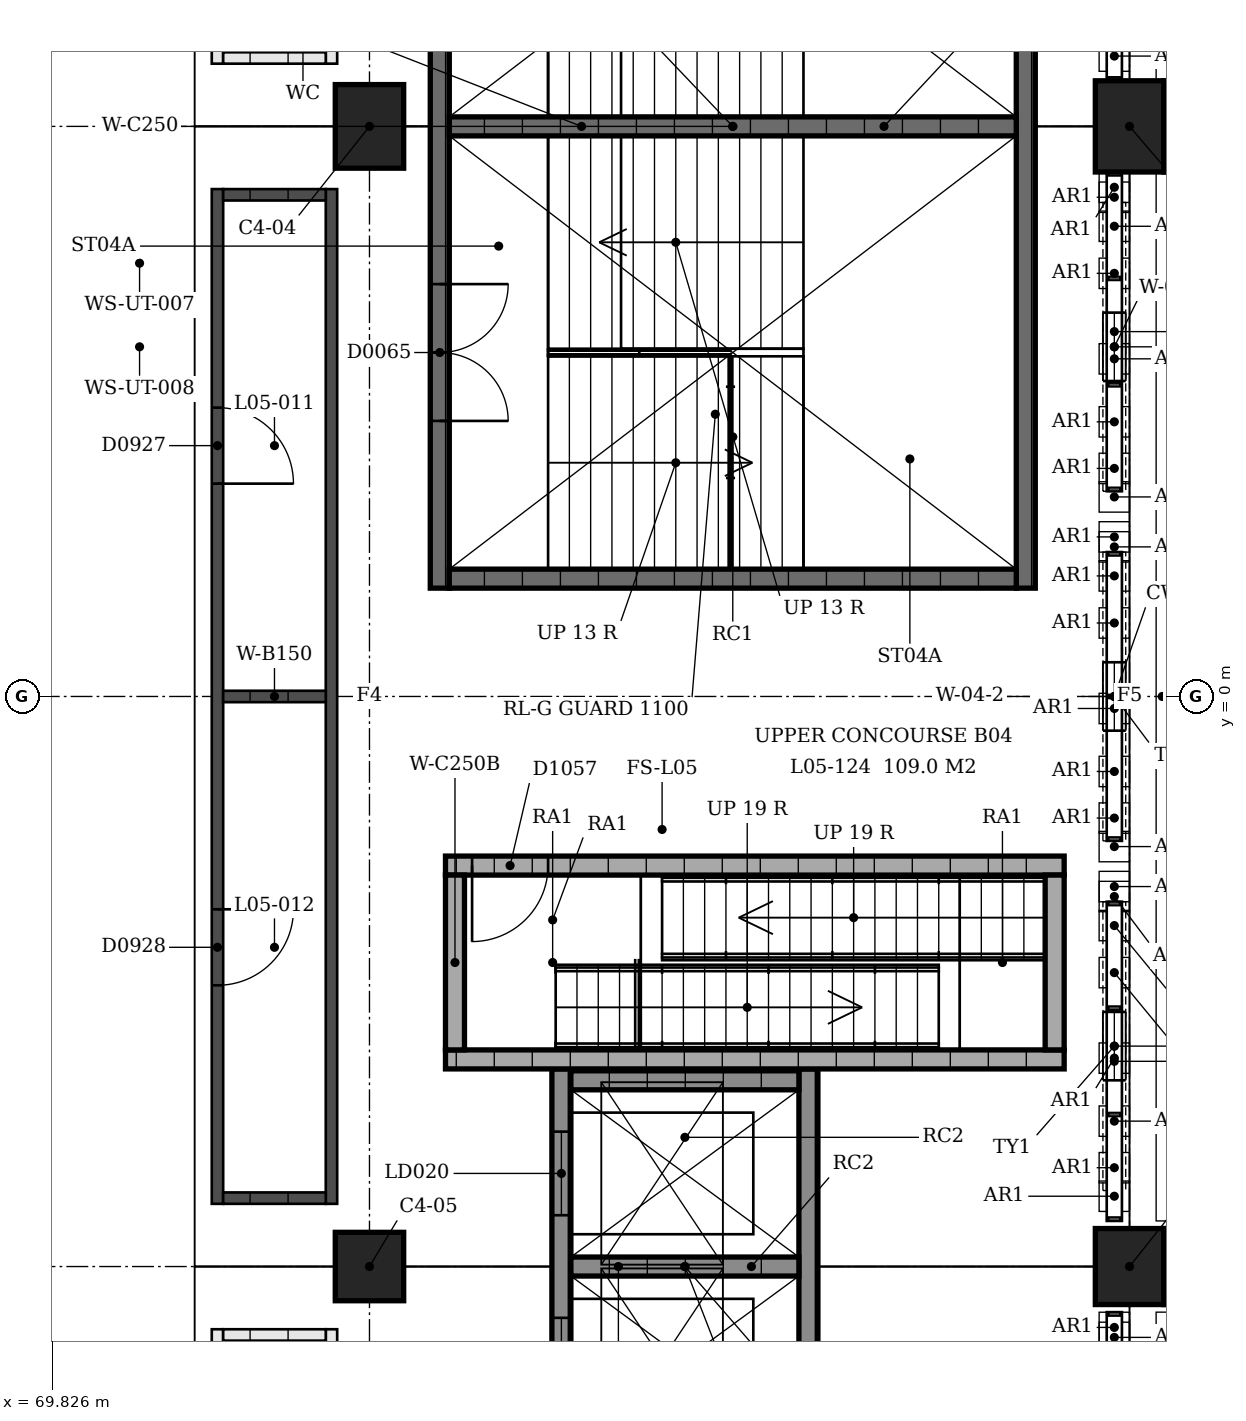
"""IFC4 building model, lengths in metres.
Left out: names, types, materials, properties, quantities, classifications, styles, units other than length and angle.
Written with IfcOpenShell. Run it as: python <this file> out.ifc"""

import sys

from ifc_helpers import new_model, si_unit, direction, frame, frame_2d, origin, origin_2d, place, context, subcontext, project, spatial, polyline, rectangle, outline, extrude, element, fill, save


model = new_model("IFC4")
c1 = context("Model", 3, precision=1e-05, world=origin(), true_north=direction((0.0, 1.0)))
c2 = subcontext(c1, "Body", "Model", "MODEL_VIEW")
j1 = project(units=[si_unit("LENGTHUNIT", "METRE"), si_unit("PLANEANGLEUNIT", "RADIAN")], contexts=[c1])
p1 = place(None, origin())
s1 = spatial("IfcSite", under=j1, at=p1, CompositionType="ELEMENT")
p2 = place(p1, origin())
s2 = spatial("IfcBuilding", under=s1, at=p2, CompositionType="ELEMENT")
p3 = place(p2, frame((0.0, 0.0, 22.5)))
s3 = spatial("IfcBuildingStorey", under=s2, at=p3, CompositionType="ELEMENT", Elevation=22.5)
p4 = place(p3, frame((74.0, 7.5, 0.0), z_axis=(0.0, 0.0, 1.0), x_axis=(0.0, 1.0, 0.0)))
e1 = element("IfcColumn", 1, at=p4, inside=s3, PredefinedType="COLUMN", context=c2, shape_type="SweptSolid", body=[
    extrude(rectangle(XDim=1.1, YDim=0.9, at=origin_2d()), origin(), (0.0, 0.0, 1.0), 6.5),
])
p5 = place(p3, frame((84.0, 7.5, 0.0), z_axis=(0.0, 0.0, 1.0), x_axis=(0.0, 1.0, 0.0)))
e2 = element("IfcColumn", 2, at=p5, inside=s3, PredefinedType="COLUMN", context=c2, shape_type="SweptSolid", body=[
    extrude(rectangle(XDim=1.2, YDim=0.9, at=origin_2d()), origin(), (0.0, 0.0, 1.0), 6.5),
])
p6 = place(p3, frame((74.0, -7.5, 0.0), z_axis=(0.0, 0.0, 1.0), x_axis=(0.0, 1.0, 0.0)))
e3 = element("IfcColumn", 3, at=p6, inside=s3, PredefinedType="COLUMN", context=c2, shape_type="SweptSolid", body=[
    extrude(rectangle(XDim=0.9, YDim=0.9, at=origin_2d()), origin(), (0.0, 0.0, 1.0), 6.5),
])
p7 = place(p3, frame((84.0, -7.5, 0.0), z_axis=(0.0, 0.0, 1.0), x_axis=(0.0, 1.0, 0.0)))
e4 = element("IfcColumn", 4, at=p7, inside=s3, PredefinedType="COLUMN", context=c2, shape_type="SweptSolid", body=[
    extrude(rectangle(XDim=1.0, YDim=0.9, at=origin_2d()), origin(), (0.0, 0.0, 1.0), 6.5),
])
p8 = place(p3, frame((83.8, 6.5, 4.1), z_axis=(0.0, 0.0, 1.0), x_axis=(0.0, -1.0, 0.0)))
e5 = element("IfcWall", 5, at=p8, inside=s3, PredefinedType="SOLIDWALL", context=c2, shape_type="SweptSolid", body=[
    extrude(outline(polyline([(0.0, 0.0), (3.8, 0.0), (3.8, 0.05), (3.676, 1.314), (3.308, 2.581), (2.709, 3.757), (1.9, 4.8), (1.091, 3.757), (0.492, 2.581), (0.124, 1.314), (0.0, 0.05), (0.0, 0.0)])), frame((0.0, 0.15, 0.0), z_axis=(0.0, -1.0, 0.0), x_axis=(1.0, 0.0, 0.0)), (0.0, 0.0, 1.0), 0.3),
])
p9 = place(p8, frame((1.45, 0.0, 0.4)))
e6 = element("IfcOpeningElement", 6, at=p9, cuts=e5, PredefinedType="OPENING", context=c2, shape_type="SweptSolid", body=[
    extrude(rectangle(XDim=0.9, YDim=3.6, at=frame_2d((0.45, 1.8))), frame((0.0, 0.16, 0.0), z_axis=(0.0, -1.0, 0.0), x_axis=(1.0, 0.0, 0.0)), (0.0, 0.0, 1.0), 0.32),
])
p10 = place(p3, frame((83.8, 1.9, 4.1), z_axis=(0.0, 0.0, 1.0), x_axis=(0.0, -1.0, 0.0)))
e7 = element("IfcWall", 7, at=p10, inside=s3, PredefinedType="SOLIDWALL", context=c2, shape_type="SweptSolid", body=[
    extrude(outline(polyline([(0.0, 0.0), (3.8, 0.0), (3.8, 0.05), (3.676, 1.314), (3.308, 2.581), (2.709, 3.757), (1.9, 4.8), (1.091, 3.757), (0.492, 2.581), (0.124, 1.314), (0.0, 0.05), (0.0, 0.0)])), frame((0.0, 0.15, 0.0), z_axis=(0.0, -1.0, 0.0), x_axis=(1.0, 0.0, 0.0)), (0.0, 0.0, 1.0), 0.3),
])
p11 = place(p10, frame((1.45, 0.0, 0.4)))
e8 = element("IfcOpeningElement", 8, at=p11, cuts=e7, PredefinedType="OPENING", context=c2, shape_type="SweptSolid", body=[
    extrude(rectangle(XDim=0.9, YDim=3.6, at=frame_2d((0.45, 1.8))), frame((0.0, 0.16, 0.0), z_axis=(0.0, -1.0, 0.0), x_axis=(1.0, 0.0, 0.0)), (0.0, 0.0, 1.0), 0.32),
])
p12 = place(p3, frame((83.8, -2.7, 4.1), z_axis=(0.0, 0.0, 1.0), x_axis=(0.0, -1.0, 0.0)))
e9 = element("IfcWall", 9, at=p12, inside=s3, PredefinedType="SOLIDWALL", context=c2, shape_type="SweptSolid", body=[
    extrude(outline(polyline([(0.0, 0.0), (3.8, 0.0), (3.8, 0.05), (3.676, 1.314), (3.308, 2.581), (2.709, 3.757), (1.9, 4.8), (1.091, 3.757), (0.492, 2.581), (0.124, 1.314), (0.0, 0.05), (0.0, 0.0)])), frame((0.0, 0.15, 0.0), z_axis=(0.0, -1.0, 0.0), x_axis=(1.0, 0.0, 0.0)), (0.0, 0.0, 1.0), 0.3),
])
p13 = place(p12, frame((1.45, 0.0, 0.4)))
e10 = element("IfcOpeningElement", 10, at=p13, cuts=e9, PredefinedType="OPENING", context=c2, shape_type="SweptSolid", body=[
    extrude(rectangle(XDim=0.9, YDim=3.6, at=frame_2d((0.45, 1.8))), frame((0.0, 0.16, 0.0), z_axis=(0.0, -1.0, 0.0), x_axis=(1.0, 0.0, 0.0)), (0.0, 0.0, 1.0), 0.32),
])
p14 = place(p3, frame((74.925, 1.425, 0.0), z_axis=(0.0, 0.0, 1.0), x_axis=(0.0, 1.0, 0.0)))
e11 = element("IfcWall", 11, at=p14, inside=s3, PredefinedType="SHEAR", context=c2, shape_type="SweptSolid", body=[
    extrude(rectangle(XDim=12.15, YDim=0.25, at=frame_2d((6.075, 0.0))), origin(), (0.0, 0.0, 1.0), 2.1),
])
p15 = place(p14, frame((2.2, 0.0, 0.0)))
e12 = element("IfcOpeningElement", 12, at=p15, cuts=e11, PredefinedType="OPENING", context=c2, shape_type="SweptSolid", body=[
    extrude(rectangle(XDim=1.8, YDim=2.1, at=frame_2d((0.9, 1.05))), frame((0.0, 0.125, 0.0), z_axis=(0.0, -1.0, 0.0), x_axis=(1.0, 0.0, 0.0)), (0.0, 0.0, 1.0), 0.25),
])
p16 = place(p14, frame((8.15, 0.0, 0.0)))
e13 = element("IfcOpeningElement", 13, at=p16, cuts=e11, PredefinedType="OPENING", context=c2, shape_type="SweptSolid", body=[
    extrude(rectangle(XDim=1.8, YDim=2.1, at=frame_2d((0.9, 1.05))), frame((0.0, 0.125, 0.0), z_axis=(0.0, -1.0, 0.0), x_axis=(1.0, 0.0, 0.0)), (0.0, 0.0, 1.0), 0.25),
])
p17 = place(p3, frame((82.635, 1.425, 0.0), z_axis=(0.0, 0.0, 1.0), x_axis=(0.0, 1.0, 0.0)))
e14 = element("IfcWall", 14, at=p17, inside=s3, PredefinedType="SHEAR", context=c2, shape_type="SweptSolid", body=[
    extrude(rectangle(XDim=12.15, YDim=0.25, at=frame_2d((6.075, 0.0))), origin(), (0.0, 0.0, 1.0), 2.1),
])
for number, where, z_axis, x_axis in (
    (15, (75.05, 1.55, 0.0), (0.0, 0.0, 1.0), (1.0, 0.0, 0.0)),
    (16, (75.05, 7.5, 0.0), (0.0, 0.0, 1.0), (1.0, 0.0, 0.0)),
):
    element("IfcWall", number, at=place(p3, frame(where, z_axis=z_axis, x_axis=x_axis)), inside=s3, PredefinedType="SHEAR", context=c2, shape_type="SweptSolid", body=[
        extrude(rectangle(XDim=7.46, YDim=0.25, at=frame_2d((3.73, 0.0))), origin(), (0.0, 0.0, 1.0), 2.1),
    ])
p18 = place(p3, frame((76.525, -10.075, 0.0), z_axis=(0.0, 0.0, 1.0), x_axis=(0.0, 1.0, 0.0)))
e17 = element("IfcWall", 17, at=p18, inside=s3, PredefinedType="SHEAR", context=c2, shape_type="SweptSolid", body=[
    extrude(rectangle(XDim=5.175, YDim=0.25, at=frame_2d((2.587, 0.0))), origin(), (0.0, 0.0, 1.0), 3.4),
])
p19 = place(p18, frame((0.8, 0.0, 0.0)))
e18 = element("IfcOpeningElement", 18, at=p19, cuts=e17, PredefinedType="OPENING", context=c2, shape_type="SweptSolid", body=[
    extrude(rectangle(XDim=1.1, YDim=2.1, at=frame_2d((0.55, 1.05))), frame((0.0, 0.125, 0.0), z_axis=(0.0, -1.0, 0.0), x_axis=(1.0, 0.0, 0.0)), (0.0, 0.0, 1.0), 0.25),
])
p20 = place(p18, frame((3.25, 0.0, 0.0)))
e19 = element("IfcOpeningElement", 19, at=p20, cuts=e17, PredefinedType="OPENING", context=c2, shape_type="SweptSolid", body=[
    extrude(rectangle(XDim=1.1, YDim=2.1, at=frame_2d((0.55, 1.05))), frame((0.0, 0.125, 0.0), z_axis=(0.0, -1.0, 0.0), x_axis=(1.0, 0.0, 0.0)), (0.0, 0.0, 1.0), 0.25),
])
p21 = place(p3, frame((79.775, -10.075, 0.0), z_axis=(0.0, 0.0, 1.0), x_axis=(0.0, 1.0, 0.0)))
e20 = element("IfcWall", 20, at=p21, inside=s3, PredefinedType="SHEAR", context=c2, shape_type="SweptSolid", body=[
    extrude(rectangle(XDim=5.175, YDim=0.25, at=frame_2d((2.587, 0.0))), origin(), (0.0, 0.0, 1.0), 3.4),
])
for number, where, z_axis, x_axis in (
    (21, (76.65, -5.05, 0.0), (0.0, 0.0, 1.0), (1.0, 0.0, 0.0)),
    (22, (76.65, -7.5, 0.0), (0.0, 0.0, 1.0), (1.0, 0.0, 0.0)),
):
    element("IfcWall", number, at=place(p3, frame(where, z_axis=z_axis, x_axis=x_axis)), inside=s3, PredefinedType="SHEAR", context=c2, shape_type="SweptSolid", body=[
        extrude(rectangle(XDim=3.0, YDim=0.25, at=frame_2d((1.5, 0.0))), origin(), (0.0, 0.0, 1.0), 3.4),
    ])
p22 = place(p3, frame((72.0, 8.325, 0.0), z_axis=(0.0, 0.0, 1.0), x_axis=(0.0, 1.0, 0.0)))
e23 = element("IfcWall", 23, at=p22, inside=s3, PredefinedType="PARTITIONING", context=c2, shape_type="SweptSolid", body=[
    extrude(rectangle(XDim=13.35, YDim=0.15, at=frame_2d((6.675, 0.0))), origin(), (0.0, 0.0, 1.0), 3.0),
])
p23 = place(p22, frame((1.671, 0.0, 0.0)))
e24 = element("IfcOpeningElement", 24, at=p23, cuts=e23, PredefinedType="OPENING", context=c2, shape_type="SweptSolid", body=[
    extrude(rectangle(XDim=0.9, YDim=2.1, at=frame_2d((0.45, 1.05))), frame((0.0, 0.075, 0.0), z_axis=(0.0, -1.0, 0.0), x_axis=(1.0, 0.0, 0.0)), (0.0, 0.0, 1.0), 0.15),
])
p24 = place(p22, frame((5.763, 0.0, 0.0)))
e25 = element("IfcOpeningElement", 25, at=p24, cuts=e23, PredefinedType="OPENING", context=c2, shape_type="SweptSolid", body=[
    extrude(rectangle(XDim=0.9, YDim=2.1, at=frame_2d((0.45, 1.05))), frame((0.0, 0.075, 0.0), z_axis=(0.0, -1.0, 0.0), x_axis=(1.0, 0.0, 0.0)), (0.0, 0.0, 1.0), 0.15),
])
p25 = place(p22, frame((8.963, 0.0, 0.0)))
e26 = element("IfcOpeningElement", 26, at=p25, cuts=e23, PredefinedType="OPENING", context=c2, shape_type="SweptSolid", body=[
    extrude(rectangle(XDim=1.1, YDim=2.1, at=frame_2d((0.55, 1.05))), frame((0.0, 0.075, 0.0), z_axis=(0.0, -1.0, 0.0), x_axis=(1.0, 0.0, 0.0)), (0.0, 0.0, 1.0), 0.15),
])
p26 = place(p22, frame((11.471, 0.0, 0.0)))
e27 = element("IfcOpeningElement", 27, at=p26, cuts=e23, PredefinedType="OPENING", context=c2, shape_type="SweptSolid", body=[
    extrude(rectangle(XDim=1.1, YDim=2.1, at=frame_2d((0.55, 1.05))), frame((0.0, 0.075, 0.0), z_axis=(0.0, -1.0, 0.0), x_axis=(1.0, 0.0, 0.0)), (0.0, 0.0, 1.0), 0.15),
])
p27 = place(p3, frame((73.5, 8.325, 0.0), z_axis=(0.0, 0.0, 1.0), x_axis=(0.0, 1.0, 0.0)))
e28 = element("IfcWall", 28, at=p27, inside=s3, PredefinedType="PARTITIONING", context=c2, shape_type="SweptSolid", body=[
    extrude(rectangle(XDim=13.35, YDim=0.15, at=frame_2d((6.675, 0.0))), origin(), (0.0, 0.0, 1.0), 3.0),
])
p28 = place(p3, frame((72.075, 8.4, 0.0), z_axis=(0.0, 0.0, 1.0), x_axis=(1.0, 0.0, 0.0)))
e29 = element("IfcWall", 29, at=p28, inside=s3, PredefinedType="PARTITIONING", context=c2, shape_type="SweptSolid", body=[
    extrude(rectangle(XDim=1.35, YDim=0.15, at=frame_2d((0.675, 0.0))), origin(), (0.0, 0.0, 1.0), 3.0),
])
p29 = place(p3, frame((72.0, 6.675, 0.0), z_axis=(0.0, 0.0, 1.0), x_axis=(0.0, -1.0, 0.0)))
e30 = element("IfcWall", 30, at=p29, inside=s3, PredefinedType="SOLIDWALL", context=c2, shape_type="SweptSolid", body=[
    extrude(rectangle(XDim=13.35, YDim=0.15, at=frame_2d((6.675, 0.0))), origin(), (0.0, 0.0, 1.0), 3.0),
])
p30 = place(p29, frame((2.875, 0.0, 0.0)))
e31 = element("IfcOpeningElement", 31, at=p30, cuts=e30, PredefinedType="OPENING", context=c2, shape_type="SweptSolid", body=[
    extrude(rectangle(XDim=1.0, YDim=2.1, at=frame_2d((0.5, 1.05))), frame((0.0, 0.075, 0.0), z_axis=(0.0, -1.0, 0.0), x_axis=(1.0, 0.0, 0.0)), (0.0, 0.0, 1.0), 0.15),
])
p31 = place(p29, frame((9.475, 0.0, 0.0)))
e32 = element("IfcOpeningElement", 32, at=p31, cuts=e30, PredefinedType="OPENING", context=c2, shape_type="SweptSolid", body=[
    extrude(rectangle(XDim=1.0, YDim=2.1, at=frame_2d((0.5, 1.05))), frame((0.0, 0.075, 0.0), z_axis=(0.0, -1.0, 0.0), x_axis=(1.0, 0.0, 0.0)), (0.0, 0.0, 1.0), 0.15),
])
p32 = place(p3, frame((73.5, 6.675, 0.0), z_axis=(0.0, 0.0, 1.0), x_axis=(0.0, -1.0, 0.0)))
e33 = element("IfcWall", 33, at=p32, inside=s3, PredefinedType="SOLIDWALL", context=c2, shape_type="SweptSolid", body=[
    extrude(rectangle(XDim=13.35, YDim=0.15, at=frame_2d((6.675, 0.0))), origin(), (0.0, 0.0, 1.0), 3.0),
])
for number, where, z_axis, x_axis in (
    (34, (72.075, 6.6, 0.0), (0.0, 0.0, 1.0), (1.0, 0.0, 0.0)),
    (35, (72.075, 0.0, 0.0), (0.0, 0.0, 1.0), (1.0, 0.0, 0.0)),
    (36, (72.075, -6.6, 0.0), (0.0, 0.0, 1.0), (1.0, 0.0, 0.0)),
):
    element("IfcWall", number, at=place(p3, frame(where, z_axis=z_axis, x_axis=x_axis)), inside=s3, PredefinedType="SOLIDWALL", context=c2, shape_type="SweptSolid", body=[
        extrude(rectangle(XDim=1.35, YDim=0.15, at=frame_2d((0.675, 0.0))), origin(), (0.0, 0.0, 1.0), 3.0),
    ])
p33 = place(p3, frame((72.0, -21.675, 0.0), z_axis=(0.0, 0.0, 1.0), x_axis=(0.0, 1.0, 0.0)))
e37 = element("IfcWall", 37, at=p33, inside=s3, PredefinedType="PARTITIONING", context=c2, shape_type="SweptSolid", body=[
    extrude(rectangle(XDim=13.35, YDim=0.15, at=frame_2d((6.675, 0.0))), origin(), (0.0, 0.0, 1.0), 3.0),
])
p34 = place(p33, frame((1.671, 0.0, 0.0)))
e38 = element("IfcOpeningElement", 38, at=p34, cuts=e37, PredefinedType="OPENING", context=c2, shape_type="SweptSolid", body=[
    extrude(rectangle(XDim=0.9, YDim=2.1, at=frame_2d((0.45, 1.05))), frame((0.0, 0.075, 0.0), z_axis=(0.0, -1.0, 0.0), x_axis=(1.0, 0.0, 0.0)), (0.0, 0.0, 1.0), 0.15),
])
p35 = place(p33, frame((5.763, 0.0, 0.0)))
e39 = element("IfcOpeningElement", 39, at=p35, cuts=e37, PredefinedType="OPENING", context=c2, shape_type="SweptSolid", body=[
    extrude(rectangle(XDim=0.9, YDim=2.1, at=frame_2d((0.45, 1.05))), frame((0.0, 0.075, 0.0), z_axis=(0.0, -1.0, 0.0), x_axis=(1.0, 0.0, 0.0)), (0.0, 0.0, 1.0), 0.15),
])
p36 = place(p33, frame((8.963, 0.0, 0.0)))
e40 = element("IfcOpeningElement", 40, at=p36, cuts=e37, PredefinedType="OPENING", context=c2, shape_type="SweptSolid", body=[
    extrude(rectangle(XDim=1.1, YDim=2.1, at=frame_2d((0.55, 1.05))), frame((0.0, 0.075, 0.0), z_axis=(0.0, -1.0, 0.0), x_axis=(1.0, 0.0, 0.0)), (0.0, 0.0, 1.0), 0.15),
])
p37 = place(p33, frame((11.471, 0.0, 0.0)))
e41 = element("IfcOpeningElement", 41, at=p37, cuts=e37, PredefinedType="OPENING", context=c2, shape_type="SweptSolid", body=[
    extrude(rectangle(XDim=1.1, YDim=2.1, at=frame_2d((0.55, 1.05))), frame((0.0, 0.075, 0.0), z_axis=(0.0, -1.0, 0.0), x_axis=(1.0, 0.0, 0.0)), (0.0, 0.0, 1.0), 0.15),
])
p38 = place(p3, frame((73.5, -21.675, 0.0), z_axis=(0.0, 0.0, 1.0), x_axis=(0.0, 1.0, 0.0)))
e42 = element("IfcWall", 42, at=p38, inside=s3, PredefinedType="PARTITIONING", context=c2, shape_type="SweptSolid", body=[
    extrude(rectangle(XDim=13.35, YDim=0.15, at=frame_2d((6.675, 0.0))), origin(), (0.0, 0.0, 1.0), 3.0),
])
p39 = place(p3, frame((72.075, -8.4, 0.0), z_axis=(0.0, 0.0, 1.0), x_axis=(1.0, 0.0, 0.0)))
e43 = element("IfcWall", 43, at=p39, inside=s3, PredefinedType="PARTITIONING", context=c2, shape_type="SweptSolid", body=[
    extrude(rectangle(XDim=1.35, YDim=0.15, at=frame_2d((0.675, 0.0))), origin(), (0.0, 0.0, 1.0), 3.0),
])
p40 = place(p3, frame((75.0, -4.775, 0.0), z_axis=(0.0, 0.0, 1.0), x_axis=(1.0, 0.0, 0.0)))
e44 = element("IfcWall", 44, at=p40, inside=s3, PredefinedType="SHEAR", context=c2, shape_type="SweptSolid", body=[
    extrude(rectangle(XDim=8.14, YDim=0.25, at=frame_2d((4.07, 0.0))), origin(), (0.0, 0.0, 1.0), 7.6),
])
p41 = place(p3, frame((75.0, -2.225, 0.0), z_axis=(0.0, 0.0, 1.0), x_axis=(1.0, 0.0, 0.0)))
e45 = element("IfcWall", 45, at=p41, inside=s3, PredefinedType="SHEAR", context=c2, shape_type="SweptSolid", body=[
    extrude(rectangle(XDim=8.14, YDim=0.25, at=frame_2d((4.07, 0.0))), origin(), (0.0, 0.0, 1.0), 7.6),
])
p42 = place(p41, frame((0.35, 0.0, 0.0)))
e46 = element("IfcOpeningElement", 46, at=p42, cuts=e45, PredefinedType="OPENING", context=c2, shape_type="SweptSolid", body=[
    extrude(rectangle(XDim=1.0, YDim=2.1, at=frame_2d((0.5, 1.05))), frame((0.0, 0.125, 0.0), z_axis=(0.0, -1.0, 0.0), x_axis=(1.0, 0.0, 0.0)), (0.0, 0.0, 1.0), 0.25),
])
for number, where, z_axis, x_axis in (
    (47, (75.125, -4.65, 0.0), (0.0, 0.0, 1.0), (0.0, 1.0, 0.0)),
    (48, (83.015, -4.65, 0.0), (0.0, 0.0, 1.0), (0.0, 1.0, 0.0)),
):
    element("IfcWall", number, at=place(p3, frame(where, z_axis=z_axis, x_axis=x_axis)), inside=s3, PredefinedType="SHEAR", context=c2, shape_type="SweptSolid", body=[
        extrude(rectangle(XDim=2.3, YDim=0.25, at=frame_2d((1.15, 0.0))), origin(), (0.0, 0.0, 1.0), 7.6),
    ])
p43 = place(p9, origin())
e49 = element("IfcWindow", 49, at=p43, inside=s3, PartitioningType="SINGLE_PANEL", PredefinedType="WINDOW", context=c2, shape_type="SweptSolid", body=[
    extrude(rectangle(XDim=0.9, YDim=3.6, at=frame_2d((0.45, 1.8))), frame((0.0, 0.03, 0.0), z_axis=(0.0, -1.0, 0.0), x_axis=(1.0, 0.0, 0.0)), (0.0, 0.0, 1.0), 0.06),
])
fill(e6, e49)
p44 = place(p11, origin())
e50 = element("IfcWindow", 50, at=p44, inside=s3, PartitioningType="SINGLE_PANEL", PredefinedType="WINDOW", context=c2, shape_type="SweptSolid", body=[
    extrude(rectangle(XDim=0.9, YDim=3.6, at=frame_2d((0.45, 1.8))), frame((0.0, 0.03, 0.0), z_axis=(0.0, -1.0, 0.0), x_axis=(1.0, 0.0, 0.0)), (0.0, 0.0, 1.0), 0.06),
])
fill(e8, e50)
p45 = place(p13, origin())
e51 = element("IfcWindow", 51, at=p45, inside=s3, PartitioningType="SINGLE_PANEL", PredefinedType="WINDOW", context=c2, shape_type="SweptSolid", body=[
    extrude(rectangle(XDim=0.9, YDim=3.6, at=frame_2d((0.45, 1.8))), frame((0.0, 0.03, 0.0), z_axis=(0.0, -1.0, 0.0), x_axis=(1.0, 0.0, 0.0)), (0.0, 0.0, 1.0), 0.06),
])
fill(e10, e51)
p46 = place(p15, origin())
e52 = element("IfcDoor", 52, at=p46, inside=s3, OperationType="DOUBLE_DOOR_SINGLE_SWING", PredefinedType="DOOR", context=c2, shape_type="SweptSolid", body=[
    extrude(rectangle(XDim=1.8, YDim=2.1, at=frame_2d((0.9, 1.05))), frame((0.0, 0.025, 0.0), z_axis=(0.0, -1.0, 0.0), x_axis=(1.0, 0.0, 0.0)), (0.0, 0.0, 1.0), 0.05),
])
fill(e12, e52)
p47 = place(p19, origin())
e53 = element("IfcDoor", 53, at=p47, inside=s3, OperationType="SLIDING_TO_LEFT", PredefinedType="DOOR", context=c2, shape_type="SweptSolid", body=[
    extrude(rectangle(XDim=1.1, YDim=2.1, at=frame_2d((0.55, 1.05))), frame((0.0, 0.025, 0.0), z_axis=(0.0, -1.0, 0.0), x_axis=(1.0, 0.0, 0.0)), (0.0, 0.0, 1.0), 0.05),
])
fill(e18, e53)
p48 = place(p20, origin())
e54 = element("IfcDoor", 54, at=p48, inside=s3, OperationType="SLIDING_TO_LEFT", PredefinedType="DOOR", context=c2, shape_type="SweptSolid", body=[
    extrude(rectangle(XDim=1.1, YDim=2.1, at=frame_2d((0.55, 1.05))), frame((0.0, 0.025, 0.0), z_axis=(0.0, -1.0, 0.0), x_axis=(1.0, 0.0, 0.0)), (0.0, 0.0, 1.0), 0.05),
])
fill(e19, e54)
p49 = place(p30, origin())
e55 = element("IfcDoor", 55, at=p49, inside=s3, OperationType="SINGLE_SWING_LEFT", PredefinedType="DOOR", context=c2, shape_type="SweptSolid", body=[
    extrude(rectangle(XDim=1.0, YDim=2.1, at=frame_2d((0.5, 1.05))), frame((0.0, 0.025, 0.0), z_axis=(0.0, -1.0, 0.0), x_axis=(1.0, 0.0, 0.0)), (0.0, 0.0, 1.0), 0.05),
])
fill(e31, e55)
p50 = place(p31, origin())
e56 = element("IfcDoor", 56, at=p50, inside=s3, OperationType="SINGLE_SWING_RIGHT", PredefinedType="DOOR", context=c2, shape_type="SweptSolid", body=[
    extrude(rectangle(XDim=1.0, YDim=2.1, at=frame_2d((0.5, 1.05))), frame((0.0, 0.025, 0.0), z_axis=(0.0, -1.0, 0.0), x_axis=(1.0, 0.0, 0.0)), (0.0, 0.0, 1.0), 0.05),
])
fill(e32, e56)
p51 = place(p42, origin())
e57 = element("IfcDoor", 57, at=p51, inside=s3, OperationType="SINGLE_SWING_LEFT", PredefinedType="DOOR", context=c2, shape_type="SweptSolid", body=[
    extrude(rectangle(XDim=1.0, YDim=2.1, at=frame_2d((0.5, 1.05))), frame((0.0, 0.025, 0.0), z_axis=(0.0, -1.0, 0.0), x_axis=(1.0, 0.0, 0.0)), (0.0, 0.0, 1.0), 0.05),
])
fill(e46, e57)
save(model, sys.argv[1])
